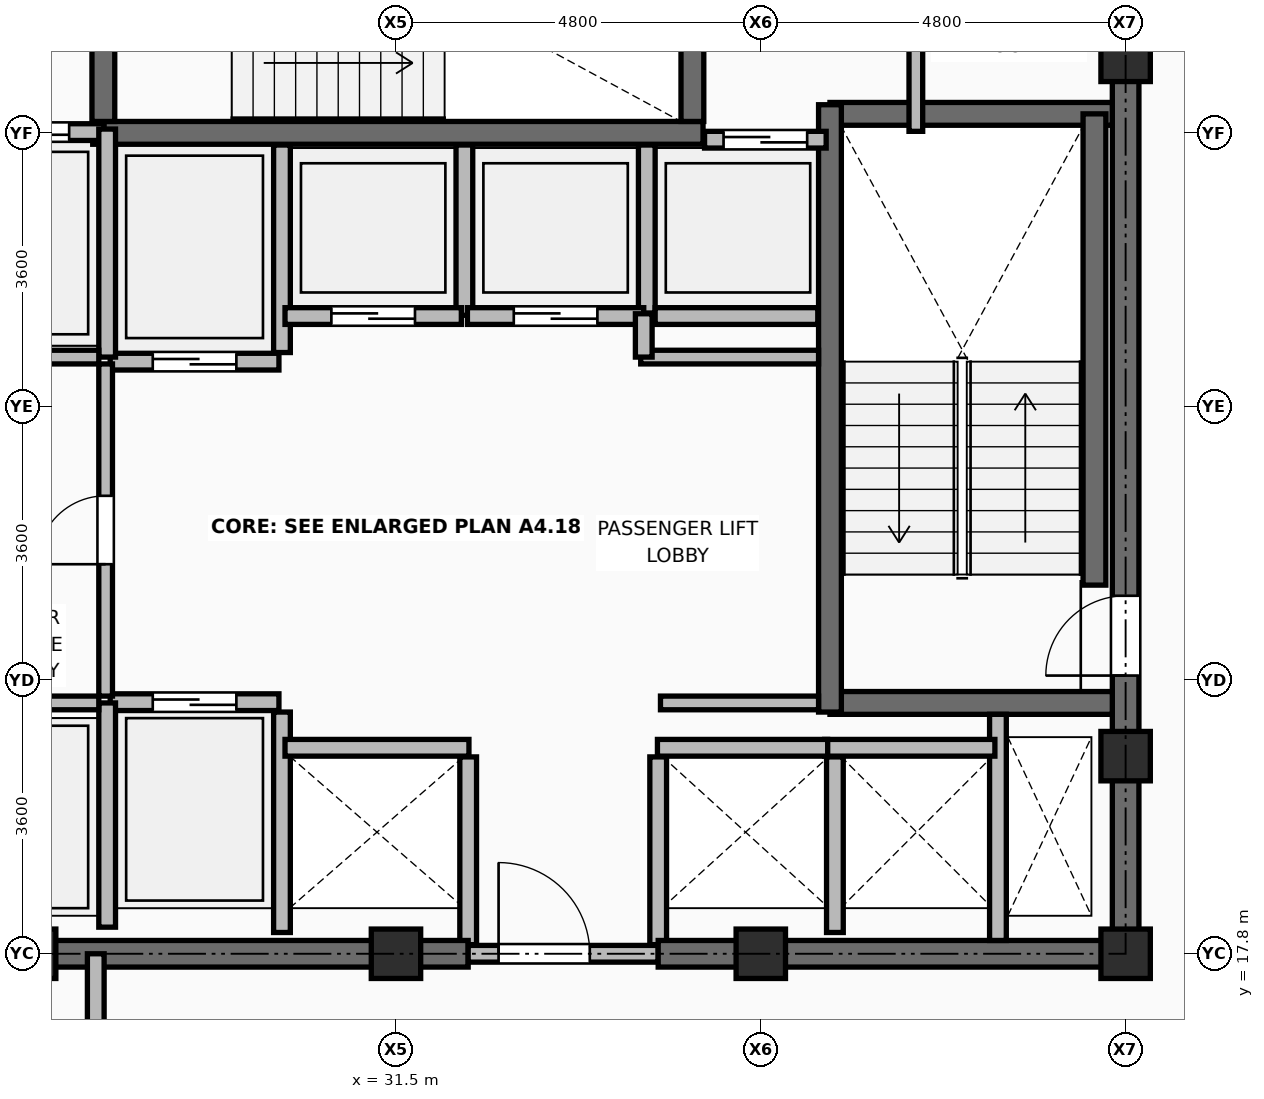
"""IFC4 building model, lengths in metres.
Left out: names, types, materials, properties, quantities, classifications, styles, units other than length and angle.
Written with IfcOpenShell. Run it as: python <this file> out.ifc"""

import sys

from ifc_helpers import new_model, si_unit, direction, frame, frame_2d, origin, origin_2d, place, context, subcontext, project, spatial, rectangle, extrude, element, fill, save


model = new_model("IFC4")
c1 = context("Model", 3, precision=1e-05, world=origin(), true_north=direction((0.0, 1.0)))
c2 = subcontext(c1, "Body", "Model", "MODEL_VIEW")
j1 = project(units=[si_unit("LENGTHUNIT", "METRE"), si_unit("PLANEANGLEUNIT", "RADIAN")], contexts=[c1])
p1 = place(None, origin())
s1 = spatial("IfcSite", under=j1, at=p1, CompositionType="ELEMENT")
p2 = place(p1, origin())
s2 = spatial("IfcBuilding", under=s1, at=p2, CompositionType="ELEMENT")
p3 = place(p2, frame((0.0, 0.0, 263.85)))
s3 = spatial("IfcBuildingStorey", under=s2, at=p3, CompositionType="ELEMENT", Elevation=263.85)
for number, where, z_axis, x_axis in (
    (1, (26.7, 17.8, 0.0), (0.0, 0.0, 1.0), (1.0, 0.0, 0.0)),
    (2, (31.5, 17.8, 0.0), (0.0, 0.0, 1.0), (1.0, 0.0, 0.0)),
    (3, (36.3, 17.8, 0.0), (0.0, 0.0, 1.0), (1.0, 0.0, 0.0)),
    (4, (41.1, 17.8, 0.0), (0.0, 0.0, 1.0), (1.0, 0.0, 0.0)),
    (5, (41.1, 20.4, 0.0), (0.0, 0.0, 1.0), (1.0, 0.0, 0.0)),
    (6, (41.1, 29.6, 0.0), (0.0, 0.0, 1.0), (1.0, 0.0, 0.0)),
):
    element("IfcColumn", number, at=place(p3, frame(where, z_axis=z_axis, x_axis=x_axis)), inside=s3, PredefinedType="COLUMN", context=c2, shape_type="SweptSolid", body=[
        extrude(rectangle(XDim=0.65, YDim=0.65, at=origin_2d()), origin(), (0.0, 0.0, 1.0), 3.75),
    ])
p4 = place(p3, frame((30.0, 18.08, 0.0), z_axis=(0.0, 0.0, 1.0), x_axis=(0.0, 1.0, 0.0)))
e7 = element("IfcWall", 7, at=p4, inside=s3, PredefinedType="PARTITIONING", context=c2, shape_type="SweptSolid", body=[
    extrude(rectangle(XDim=2.9, YDim=0.22, at=frame_2d((1.45, 0.0))), origin(), (0.0, 0.0, 1.0), 3.545),
])
for number, where, z_axis, x_axis in (
    (8, (32.45, 17.92, 0.0), (0.0, 0.0, 1.0), (0.0, 1.0, 0.0)),
    (9, (34.95, 17.92, 0.0), (0.0, 0.0, 1.0), (0.0, 1.0, 0.0)),
):
    element("IfcWall", number, at=place(p3, frame(where, z_axis=z_axis, x_axis=x_axis)), inside=s3, PredefinedType="PARTITIONING", context=c2, shape_type="SweptSolid", body=[
        extrude(rectangle(XDim=2.47, YDim=0.22, at=frame_2d((1.235, 0.0))), origin(), (0.0, 0.0, 1.0), 3.545),
    ])
p5 = place(p3, frame((37.275, 18.08, 0.0), z_axis=(0.0, 0.0, 1.0), x_axis=(0.0, 1.0, 0.0)))
e10 = element("IfcWall", 10, at=p5, inside=s3, PredefinedType="PARTITIONING", context=c2, shape_type="SweptSolid", body=[
    extrude(rectangle(XDim=2.31, YDim=0.22, at=frame_2d((1.155, 0.0))), origin(), (0.0, 0.0, 1.0), 3.545),
])
p6 = place(p3, frame((30.0, 25.71, 0.0), z_axis=(0.0, 0.0, 1.0), x_axis=(0.0, 1.0, 0.0)))
e11 = element("IfcWall", 11, at=p6, inside=s3, PredefinedType="PARTITIONING", context=c2, shape_type="SweptSolid", body=[
    extrude(rectangle(XDim=2.73, YDim=0.22, at=frame_2d((1.365, 0.0))), origin(), (0.0, 0.0, 1.0), 3.545),
])
p7 = place(p3, frame((32.4, 26.2, 0.0), z_axis=(0.0, 0.0, 1.0), x_axis=(0.0, 1.0, 0.0)))
e12 = element("IfcWall", 12, at=p7, inside=s3, PredefinedType="PARTITIONING", context=c2, shape_type="SweptSolid", body=[
    extrude(rectangle(XDim=2.24, YDim=0.22, at=frame_2d((1.12, 0.0))), origin(), (0.0, 0.0, 1.0), 3.545),
])
p8 = place(p3, frame((34.8, 26.23, 0.0), z_axis=(0.0, 0.0, 1.0), x_axis=(0.0, 1.0, 0.0)))
e13 = element("IfcWall", 13, at=p8, inside=s3, PredefinedType="PARTITIONING", context=c2, shape_type="SweptSolid", body=[
    extrude(rectangle(XDim=2.21, YDim=0.22, at=frame_2d((1.105, 0.0))), origin(), (0.0, 0.0, 1.0), 3.545),
])
p9 = place(p3, frame((34.91, 26.19, 0.0), z_axis=(0.0, 0.0, 1.0), x_axis=(1.0, 0.0, 0.0)))
e14 = element("IfcWall", 14, at=p9, inside=s3, PredefinedType="PARTITIONING", context=c2, shape_type="SweptSolid", body=[
    extrude(rectangle(XDim=2.14, YDim=0.22, at=frame_2d((1.07, 0.0))), origin(), (0.0, 0.0, 1.0), 3.545),
])
p10 = place(p3, frame((25.55, 17.8, 0.0), z_axis=(0.0, 0.0, 1.0), x_axis=(1.0, 0.0, 0.0)))
e15 = element("IfcWall", 15, at=p10, inside=s3, PredefinedType="SHEAR", context=c2, shape_type="SweptSolid", body=[
    extrude(rectangle(XDim=6.9, YDim=0.35, at=frame_2d((3.45, 0.0))), origin(), (0.0, 0.0, 1.0), 3.57),
])
p11 = place(p3, frame((32.45, 17.8, 0.0), z_axis=(0.0, 0.0, 1.0), x_axis=(1.0, 0.0, 0.0)))
e16 = element("IfcWall", 16, at=p11, inside=s3, PredefinedType="PARTITIONING", context=c2, shape_type="SweptSolid", body=[
    extrude(rectangle(XDim=2.5, YDim=0.22, at=frame_2d((1.25, 0.0))), origin(), (0.0, 0.0, 1.0), 3.132),
])
p12 = place(p11, frame((0.4, 0.0, 0.0)))
e17 = element("IfcOpeningElement", 17, at=p12, cuts=e16, PredefinedType="OPENING", context=c2, shape_type="SweptSolid", body=[
    extrude(rectangle(XDim=1.2, YDim=2.1, at=frame_2d((0.6, 1.05))), frame((0.0, 0.12, 0.0), z_axis=(0.0, -1.0, 0.0), x_axis=(1.0, 0.0, 0.0)), (0.0, 0.0, 1.0), 0.24),
])
p13 = place(p3, frame((34.95, 17.8, 0.0), z_axis=(0.0, 0.0, 1.0), x_axis=(1.0, 0.0, 0.0)))
e18 = element("IfcWall", 18, at=p13, inside=s3, PredefinedType="SHEAR", context=c2, shape_type="SweptSolid", body=[
    extrude(rectangle(XDim=6.325, YDim=0.35, at=frame_2d((3.163, 0.0))), origin(), (0.0, 0.0, 1.0), 3.57),
])
p14 = place(p3, frame((41.1, 17.975, 0.0), z_axis=(0.0, 0.0, 1.0), x_axis=(0.0, 1.0, 0.0)))
e19 = element("IfcWall", 19, at=p14, inside=s3, PredefinedType="SHEAR", context=c2, shape_type="SweptSolid", body=[
    extrude(rectangle(XDim=14.3, YDim=0.35, at=frame_2d((7.15, 0.0))), origin(), (0.0, 0.0, 1.0), 3.57),
])
p15 = place(p14, frame((3.485, 0.0, 0.0)))
e20 = element("IfcOpeningElement", 20, at=p15, cuts=e19, PredefinedType="OPENING", context=c2, shape_type="SweptSolid", body=[
    extrude(rectangle(XDim=1.05, YDim=2.1, at=frame_2d((0.525, 1.05))), frame((0.0, 0.185, 0.0), z_axis=(0.0, -1.0, 0.0), x_axis=(1.0, 0.0, 0.0)), (0.0, 0.0, 1.0), 0.37),
])
for number, where, z_axis, x_axis in (
    (21, (37.21, 21.1, 0.0), (0.0, 0.0, 1.0), (1.0, 0.0, 0.0)),
    (22, (37.21, 28.85, 0.0), (0.0, 0.0, 1.0), (1.0, 0.0, 0.0)),
):
    element("IfcWall", number, at=place(p3, frame(where, z_axis=z_axis, x_axis=x_axis)), inside=s3, PredefinedType="SHEAR", context=c2, shape_type="SweptSolid", body=[
        extrude(rectangle(XDim=3.715, YDim=0.3, at=frame_2d((1.857, 0.0))), origin(), (0.0, 0.0, 1.0), 3.57),
    ])
p16 = place(p3, frame((37.21, 20.98, 0.0), z_axis=(0.0, 0.0, 1.0), x_axis=(0.0, 1.0, 0.0)))
e23 = element("IfcWall", 23, at=p16, inside=s3, PredefinedType="SHEAR", context=c2, shape_type="SweptSolid", body=[
    extrude(rectangle(XDim=7.99, YDim=0.3, at=frame_2d((3.995, 0.0))), origin(), (0.0, 0.0, 1.0), 3.57),
])
p17 = place(p3, frame((40.69, 22.65, 0.0), z_axis=(0.0, 0.0, 1.0), x_axis=(0.0, 1.0, 0.0)))
e24 = element("IfcWall", 24, at=p17, inside=s3, PredefinedType="SHEAR", context=c2, shape_type="SweptSolid", body=[
    extrude(rectangle(XDim=6.2, YDim=0.3, at=frame_2d((3.1, 0.0))), origin(), (0.0, 0.0, 1.0), 3.57),
])
p18 = place(p3, frame((27.51, 28.6, 0.0), z_axis=(0.0, 0.0, 1.0), x_axis=(1.0, 0.0, 0.0)))
e25 = element("IfcWall", 25, at=p18, inside=s3, PredefinedType="SHEAR", context=c2, shape_type="SweptSolid", body=[
    extrude(rectangle(XDim=8.03, YDim=0.3, at=frame_2d((4.015, 0.0))), origin(), (0.0, 0.0, 1.0), 3.57),
])
p19 = place(p3, frame((27.65, 28.75, 0.0), z_axis=(0.0, 0.0, 1.0), x_axis=(0.0, 1.0, 0.0)))
e26 = element("IfcWall", 26, at=p19, inside=s3, PredefinedType="SHEAR", context=c2, shape_type="SweptSolid", body=[
    extrude(rectangle(XDim=3.525, YDim=0.3, at=frame_2d((1.762, 0.0))), origin(), (0.0, 0.0, 1.0), 3.57),
])
p20 = place(p19, frame((1.0, 0.0, 0.0)))
e27 = element("IfcOpeningElement", 27, at=p20, cuts=e26, PredefinedType="OPENING", context=c2, shape_type="SweptSolid", body=[
    extrude(rectangle(XDim=1.05, YDim=2.1, at=frame_2d((0.525, 1.05))), frame((0.0, 0.16, 0.0), z_axis=(0.0, -1.0, 0.0), x_axis=(1.0, 0.0, 0.0)), (0.0, 0.0, 1.0), 0.32),
])
p21 = place(p3, frame((35.4, 28.75, 0.0), z_axis=(0.0, 0.0, 1.0), x_axis=(0.0, 1.0, 0.0)))
e28 = element("IfcWall", 28, at=p21, inside=s3, PredefinedType="SHEAR", context=c2, shape_type="SweptSolid", body=[
    extrude(rectangle(XDim=3.525, YDim=0.3, at=frame_2d((1.762, 0.0))), origin(), (0.0, 0.0, 1.0), 3.57),
])
p22 = place(p3, frame((39.42, 17.975, 0.0), z_axis=(0.0, 0.0, 1.0), x_axis=(0.0, 1.0, 0.0)))
e29 = element("IfcWall", 29, at=p22, inside=s3, PredefinedType="PARTITIONING", context=c2, shape_type="SweptSolid", body=[
    extrude(rectangle(XDim=2.975, YDim=0.22, at=frame_2d((1.487, 0.0))), origin(), (0.0, 0.0, 1.0), 3.132),
])
p23 = place(p3, frame((25.64, 28.61, 0.0), z_axis=(0.0, 0.0, 1.0), x_axis=(1.0, 0.0, 0.0)))
e30 = element("IfcWall", 30, at=p23, inside=s3, PredefinedType="PARTITIONING", context=c2, shape_type="SweptSolid", body=[
    extrude(rectangle(XDim=2.02, YDim=0.22, at=frame_2d((1.01, 0.0))), origin(), (0.0, 0.0, 1.0), 3.55),
])
p24 = place(p23, frame((0.46, 0.0, 0.0)))
e31 = element("IfcOpeningElement", 31, at=p24, cuts=e30, PredefinedType="OPENING", context=c2, shape_type="SweptSolid", body=[
    extrude(rectangle(XDim=1.1, YDim=2.2, at=frame_2d((0.55, 1.1))), frame((0.0, 0.12, 0.0), z_axis=(0.0, -1.0, 0.0), x_axis=(1.0, 0.0, 0.0)), (0.0, 0.0, 1.0), 0.24),
])
p25 = place(p3, frame((27.74, 21.11, 0.0), z_axis=(0.0, 0.0, 1.0), x_axis=(1.0, 0.0, 0.0)))
e32 = element("IfcWall", 32, at=p25, inside=s3, PredefinedType="PARTITIONING", context=c2, shape_type="SweptSolid", body=[
    extrude(rectangle(XDim=2.22, YDim=0.22, at=frame_2d((1.11, 0.0))), origin(), (0.0, 0.0, 1.0), 3.55),
])
p26 = place(p25, frame((0.56, 0.0, 0.0)))
e33 = element("IfcOpeningElement", 33, at=p26, cuts=e32, PredefinedType="OPENING", context=c2, shape_type="SweptSolid", body=[
    extrude(rectangle(XDim=1.1, YDim=2.2, at=frame_2d((0.55, 1.1))), frame((0.0, 0.12, 0.0), z_axis=(0.0, -1.0, 0.0), x_axis=(1.0, 0.0, 0.0)), (0.0, 0.0, 1.0), 0.24),
])
p27 = place(p3, frame((27.74, 25.59, 0.0), z_axis=(0.0, 0.0, 1.0), x_axis=(1.0, 0.0, 0.0)))
e34 = element("IfcWall", 34, at=p27, inside=s3, PredefinedType="PARTITIONING", context=c2, shape_type="SweptSolid", body=[
    extrude(rectangle(XDim=2.22, YDim=0.22, at=frame_2d((1.11, 0.0))), origin(), (0.0, 0.0, 1.0), 3.55),
])
p28 = place(p27, frame((0.56, 0.0, 0.0)))
e35 = element("IfcOpeningElement", 35, at=p28, cuts=e34, PredefinedType="OPENING", context=c2, shape_type="SweptSolid", body=[
    extrude(rectangle(XDim=1.1, YDim=2.2, at=frame_2d((0.55, 1.1))), frame((0.0, 0.12, 0.0), z_axis=(0.0, -1.0, 0.0), x_axis=(1.0, 0.0, 0.0)), (0.0, 0.0, 1.0), 0.24),
])
p29 = place(p3, frame((30.04, 20.51, 0.0), z_axis=(0.0, 0.0, 1.0), x_axis=(1.0, 0.0, 0.0)))
e36 = element("IfcWall", 36, at=p29, inside=s3, PredefinedType="PARTITIONING", context=c2, shape_type="SweptSolid", body=[
    extrude(rectangle(XDim=2.42, YDim=0.22, at=frame_2d((1.21, 0.0))), origin(), (0.0, 0.0, 1.0), 3.55),
])
for number, where, z_axis, x_axis in (
    (37, (37.14, 20.51, 0.0), (0.0, 0.0, 1.0), (1.0, 0.0, 0.0)),
    (38, (34.94, 20.51, 0.0), (0.0, 0.0, 1.0), (1.0, 0.0, 0.0)),
):
    element("IfcWall", number, at=place(p3, frame(where, z_axis=z_axis, x_axis=x_axis)), inside=s3, PredefinedType="PARTITIONING", context=c2, shape_type="SweptSolid", body=[
        extrude(rectangle(XDim=2.24, YDim=0.22, at=frame_2d((1.12, 0.0))), origin(), (0.0, 0.0, 1.0), 3.55),
    ])
p30 = place(p3, frame((30.04, 26.19, 0.0), z_axis=(0.0, 0.0, 1.0), x_axis=(1.0, 0.0, 0.0)))
e39 = element("IfcWall", 39, at=p30, inside=s3, PredefinedType="PARTITIONING", context=c2, shape_type="SweptSolid", body=[
    extrude(rectangle(XDim=2.32, YDim=0.22, at=frame_2d((1.16, 0.0))), origin(), (0.0, 0.0, 1.0), 3.55),
])
p31 = place(p30, frame((0.61, 0.0, 0.0)))
e40 = element("IfcOpeningElement", 40, at=p31, cuts=e39, PredefinedType="OPENING", context=c2, shape_type="SweptSolid", body=[
    extrude(rectangle(XDim=1.1, YDim=2.2, at=frame_2d((0.55, 1.1))), frame((0.0, 0.12, 0.0), z_axis=(0.0, -1.0, 0.0), x_axis=(1.0, 0.0, 0.0)), (0.0, 0.0, 1.0), 0.24),
])
p32 = place(p3, frame((32.44, 26.19, 0.0), z_axis=(0.0, 0.0, 1.0), x_axis=(1.0, 0.0, 0.0)))
e41 = element("IfcWall", 41, at=p32, inside=s3, PredefinedType="PARTITIONING", context=c2, shape_type="SweptSolid", body=[
    extrude(rectangle(XDim=2.32, YDim=0.22, at=frame_2d((1.16, 0.0))), origin(), (0.0, 0.0, 1.0), 3.55),
])
p33 = place(p32, frame((0.61, 0.0, 0.0)))
e42 = element("IfcOpeningElement", 42, at=p33, cuts=e41, PredefinedType="OPENING", context=c2, shape_type="SweptSolid", body=[
    extrude(rectangle(XDim=1.1, YDim=2.2, at=frame_2d((0.55, 1.1))), frame((0.0, 0.12, 0.0), z_axis=(0.0, -1.0, 0.0), x_axis=(1.0, 0.0, 0.0)), (0.0, 0.0, 1.0), 0.24),
])
p34 = place(p3, frame((35.56, 28.51, 0.0), z_axis=(0.0, 0.0, 1.0), x_axis=(1.0, 0.0, 0.0)))
e43 = element("IfcWall", 43, at=p34, inside=s3, PredefinedType="PARTITIONING", context=c2, shape_type="SweptSolid", body=[
    extrude(rectangle(XDim=1.6, YDim=0.22, at=frame_2d((0.8, 0.0))), origin(), (0.0, 0.0, 1.0), 3.55),
])
p35 = place(p34, frame((0.25, 0.0, 0.0)))
e44 = element("IfcOpeningElement", 44, at=p35, cuts=e43, PredefinedType="OPENING", context=c2, shape_type="SweptSolid", body=[
    extrude(rectangle(XDim=1.1, YDim=2.2, at=frame_2d((0.55, 1.1))), frame((0.0, 0.12, 0.0), z_axis=(0.0, -1.0, 0.0), x_axis=(1.0, 0.0, 0.0)), (0.0, 0.0, 1.0), 0.24),
])
p36 = place(p3, frame((27.7, 18.15, 0.0), z_axis=(0.0, 0.0, 1.0), x_axis=(0.0, 1.0, 0.0)))
e45 = element("IfcWall", 45, at=p36, inside=s3, PredefinedType="PARTITIONING", context=c2, shape_type="SweptSolid", body=[
    extrude(rectangle(XDim=2.95, YDim=0.22, at=frame_2d((1.475, 0.0))), origin(), (0.0, 0.0, 1.0), 3.55),
])
p37 = place(p3, frame((27.7, 25.65, 0.0), z_axis=(0.0, 0.0, 1.0), x_axis=(0.0, 1.0, 0.0)))
e46 = element("IfcWall", 46, at=p37, inside=s3, PredefinedType="PARTITIONING", context=c2, shape_type="SweptSolid", body=[
    extrude(rectangle(XDim=3.0, YDim=0.22, at=frame_2d((1.5, 0.0))), origin(), (0.0, 0.0, 1.0), 3.55),
])
for number, where, z_axis, x_axis in (
    (47, (25.89, 21.1, 0.0), (0.0, 0.0, 1.0), (1.0, 0.0, 0.0)),
    (48, (25.89, 25.65, 0.0), (0.0, 0.0, 1.0), (1.0, 0.0, 0.0)),
):
    element("IfcWall", number, at=place(p3, frame(where, z_axis=z_axis, x_axis=x_axis)), inside=s3, PredefinedType="PARTITIONING", context=c2, shape_type="SweptSolid", body=[
        extrude(rectangle(XDim=1.7, YDim=0.18, at=frame_2d((0.85, 0.0))), origin(), (0.0, 0.0, 1.0), 3.55),
    ])
p38 = place(p3, frame((27.68, 21.19, 0.0), z_axis=(0.0, 0.0, 1.0), x_axis=(0.0, 1.0, 0.0)))
e49 = element("IfcWall", 49, at=p38, inside=s3, PredefinedType="PARTITIONING", context=c2, shape_type="SweptSolid", body=[
    extrude(rectangle(XDim=4.37, YDim=0.18, at=frame_2d((2.185, 0.0))), origin(), (0.0, 0.0, 1.0), 3.55),
])
p39 = place(p38, frame((1.735, 0.0, 0.0)))
e50 = element("IfcOpeningElement", 50, at=p39, cuts=e49, PredefinedType="OPENING", context=c2, shape_type="SweptSolid", body=[
    extrude(rectangle(XDim=0.9, YDim=2.1, at=frame_2d((0.45, 1.05))), frame((0.0, 0.1, 0.0), z_axis=(0.0, -1.0, 0.0), x_axis=(1.0, 0.0, 0.0)), (0.0, 0.0, 1.0), 0.2),
])
p40 = place(p3, frame((34.98, 21.1, 0.0), z_axis=(0.0, 0.0, 1.0), x_axis=(1.0, 0.0, 0.0)))
e51 = element("IfcWall", 51, at=p40, inside=s3, PredefinedType="PARTITIONING", context=c2, shape_type="SweptSolid", body=[
    extrude(rectangle(XDim=2.08, YDim=0.18, at=frame_2d((1.04, 0.0))), origin(), (0.0, 0.0, 1.0), 3.55),
])
p41 = place(p3, frame((34.72, 25.65, 0.0), z_axis=(0.0, 0.0, 1.0), x_axis=(1.0, 0.0, 0.0)))
e52 = element("IfcWall", 52, at=p41, inside=s3, PredefinedType="PARTITIONING", context=c2, shape_type="SweptSolid", body=[
    extrude(rectangle(XDim=2.34, YDim=0.18, at=frame_2d((1.17, 0.0))), origin(), (0.0, 0.0, 1.0), 3.55),
])
p42 = place(p3, frame((34.76, 25.65, 0.0), z_axis=(0.0, 0.0, 1.0), x_axis=(0.0, 1.0, 0.0)))
e53 = element("IfcWall", 53, at=p42, inside=s3, PredefinedType="PARTITIONING", context=c2, shape_type="SweptSolid", body=[
    extrude(rectangle(XDim=0.57, YDim=0.22, at=frame_2d((0.285, 0.0))), origin(), (0.0, 0.0, 1.0), 3.55),
])
p43 = place(p3, frame((27.55, 14.35, 0.0), z_axis=(0.0, 0.0, 1.0), x_axis=(0.0, 1.0, 0.0)))
e54 = element("IfcWall", 54, at=p43, inside=s3, PredefinedType="PARTITIONING", context=c2, shape_type="SweptSolid", body=[
    extrude(rectangle(XDim=3.45, YDim=0.22, at=frame_2d((1.725, 0.0))), origin(), (0.0, 0.0, 1.0), 3.132),
])
p44 = place(p43, frame((1.175, 0.0, 0.0)))
e55 = element("IfcOpeningElement", 55, at=p44, cuts=e54, PredefinedType="OPENING", context=c2, shape_type="SweptSolid", body=[
    extrude(rectangle(XDim=1.1, YDim=2.1, at=frame_2d((0.55, 1.05))), frame((0.0, 0.12, 0.0), z_axis=(0.0, -1.0, 0.0), x_axis=(1.0, 0.0, 0.0)), (0.0, 0.0, 1.0), 0.24),
])
p45 = place(p3, frame((38.34, 28.62, 0.0), z_axis=(0.0, 0.0, 1.0), x_axis=(0.0, 1.0, 0.0)))
e56 = element("IfcWall", 56, at=p45, inside=s3, PredefinedType="PARTITIONING", context=c2, shape_type="SweptSolid", body=[
    extrude(rectangle(XDim=3.655, YDim=0.18, at=frame_2d((1.827, 0.0))), origin(), (0.0, 0.0, 1.0), 3.132),
])
p46 = place(p12, origin())
e57 = element("IfcDoor", 57, at=p46, inside=s3, OperationType="SINGLE_SWING_LEFT", PredefinedType="DOOR", context=c2, shape_type="SweptSolid", body=[
    extrude(rectangle(XDim=1.2, YDim=2.1, at=frame_2d((0.6, 1.05))), frame((0.0, 0.025, 0.0), z_axis=(0.0, -1.0, 0.0), x_axis=(1.0, 0.0, 0.0)), (0.0, 0.0, 1.0), 0.05),
])
fill(e17, e57)
p47 = place(p15, origin())
e58 = element("IfcDoor", 58, at=p47, inside=s3, OperationType="SINGLE_SWING_LEFT", PredefinedType="DOOR", context=c2, shape_type="SweptSolid", body=[
    extrude(rectangle(XDim=1.05, YDim=2.1, at=frame_2d((0.525, 1.05))), frame((0.0, 0.025, 0.0), z_axis=(0.0, -1.0, 0.0), x_axis=(1.0, 0.0, 0.0)), (0.0, 0.0, 1.0), 0.05),
])
fill(e20, e58)
p48 = place(p24, origin())
e59 = element("IfcDoor", 59, at=p48, inside=s3, OperationType="DOUBLE_DOOR_SLIDING", PredefinedType="DOOR", context=c2, shape_type="SweptSolid", body=[
    extrude(rectangle(XDim=1.1, YDim=2.2, at=frame_2d((0.55, 1.1))), frame((0.0, 0.025, 0.0), z_axis=(0.0, -1.0, 0.0), x_axis=(1.0, 0.0, 0.0)), (0.0, 0.0, 1.0), 0.05),
])
fill(e31, e59)
p49 = place(p26, origin())
e60 = element("IfcDoor", 60, at=p49, inside=s3, OperationType="DOUBLE_DOOR_SLIDING", PredefinedType="DOOR", context=c2, shape_type="SweptSolid", body=[
    extrude(rectangle(XDim=1.1, YDim=2.2, at=frame_2d((0.55, 1.1))), frame((0.0, 0.025, 0.0), z_axis=(0.0, -1.0, 0.0), x_axis=(1.0, 0.0, 0.0)), (0.0, 0.0, 1.0), 0.05),
])
fill(e33, e60)
p50 = place(p28, frame((1.1, 0.0, 0.0), z_axis=(0.0, 0.0, 1.0), x_axis=(-1.0, 0.0, 0.0)))
e61 = element("IfcDoor", 61, at=p50, inside=s3, OperationType="DOUBLE_DOOR_SLIDING", PredefinedType="DOOR", context=c2, shape_type="SweptSolid", body=[
    extrude(rectangle(XDim=1.1, YDim=2.2, at=frame_2d((0.55, 1.1))), frame((0.0, 0.025, 0.0), z_axis=(0.0, -1.0, 0.0), x_axis=(1.0, 0.0, 0.0)), (0.0, 0.0, 1.0), 0.05),
])
fill(e35, e61)
p51 = place(p31, frame((1.1, 0.0, 0.0), z_axis=(0.0, 0.0, 1.0), x_axis=(-1.0, 0.0, 0.0)))
e62 = element("IfcDoor", 62, at=p51, inside=s3, OperationType="DOUBLE_DOOR_SLIDING", PredefinedType="DOOR", context=c2, shape_type="SweptSolid", body=[
    extrude(rectangle(XDim=1.1, YDim=2.2, at=frame_2d((0.55, 1.1))), frame((0.0, 0.025, 0.0), z_axis=(0.0, -1.0, 0.0), x_axis=(1.0, 0.0, 0.0)), (0.0, 0.0, 1.0), 0.05),
])
fill(e40, e62)
p52 = place(p33, frame((1.1, 0.0, 0.0), z_axis=(0.0, 0.0, 1.0), x_axis=(-1.0, 0.0, 0.0)))
e63 = element("IfcDoor", 63, at=p52, inside=s3, OperationType="DOUBLE_DOOR_SLIDING", PredefinedType="DOOR", context=c2, shape_type="SweptSolid", body=[
    extrude(rectangle(XDim=1.1, YDim=2.2, at=frame_2d((0.55, 1.1))), frame((0.0, 0.025, 0.0), z_axis=(0.0, -1.0, 0.0), x_axis=(1.0, 0.0, 0.0)), (0.0, 0.0, 1.0), 0.05),
])
fill(e42, e63)
p53 = place(p35, origin())
e64 = element("IfcDoor", 64, at=p53, inside=s3, OperationType="DOUBLE_DOOR_SLIDING", PredefinedType="DOOR", context=c2, shape_type="SweptSolid", body=[
    extrude(rectangle(XDim=1.1, YDim=2.2, at=frame_2d((0.55, 1.1))), frame((0.0, 0.025, 0.0), z_axis=(0.0, -1.0, 0.0), x_axis=(1.0, 0.0, 0.0)), (0.0, 0.0, 1.0), 0.05),
])
fill(e44, e64)
p54 = place(p39, origin())
e65 = element("IfcDoor", 65, at=p54, inside=s3, OperationType="SINGLE_SWING_LEFT", PredefinedType="DOOR", context=c2, shape_type="SweptSolid", body=[
    extrude(rectangle(XDim=0.9, YDim=2.1, at=frame_2d((0.45, 1.05))), frame((0.0, 0.025, 0.0), z_axis=(0.0, -1.0, 0.0), x_axis=(1.0, 0.0, 0.0)), (0.0, 0.0, 1.0), 0.05),
])
fill(e50, e65)
save(model, sys.argv[1])
